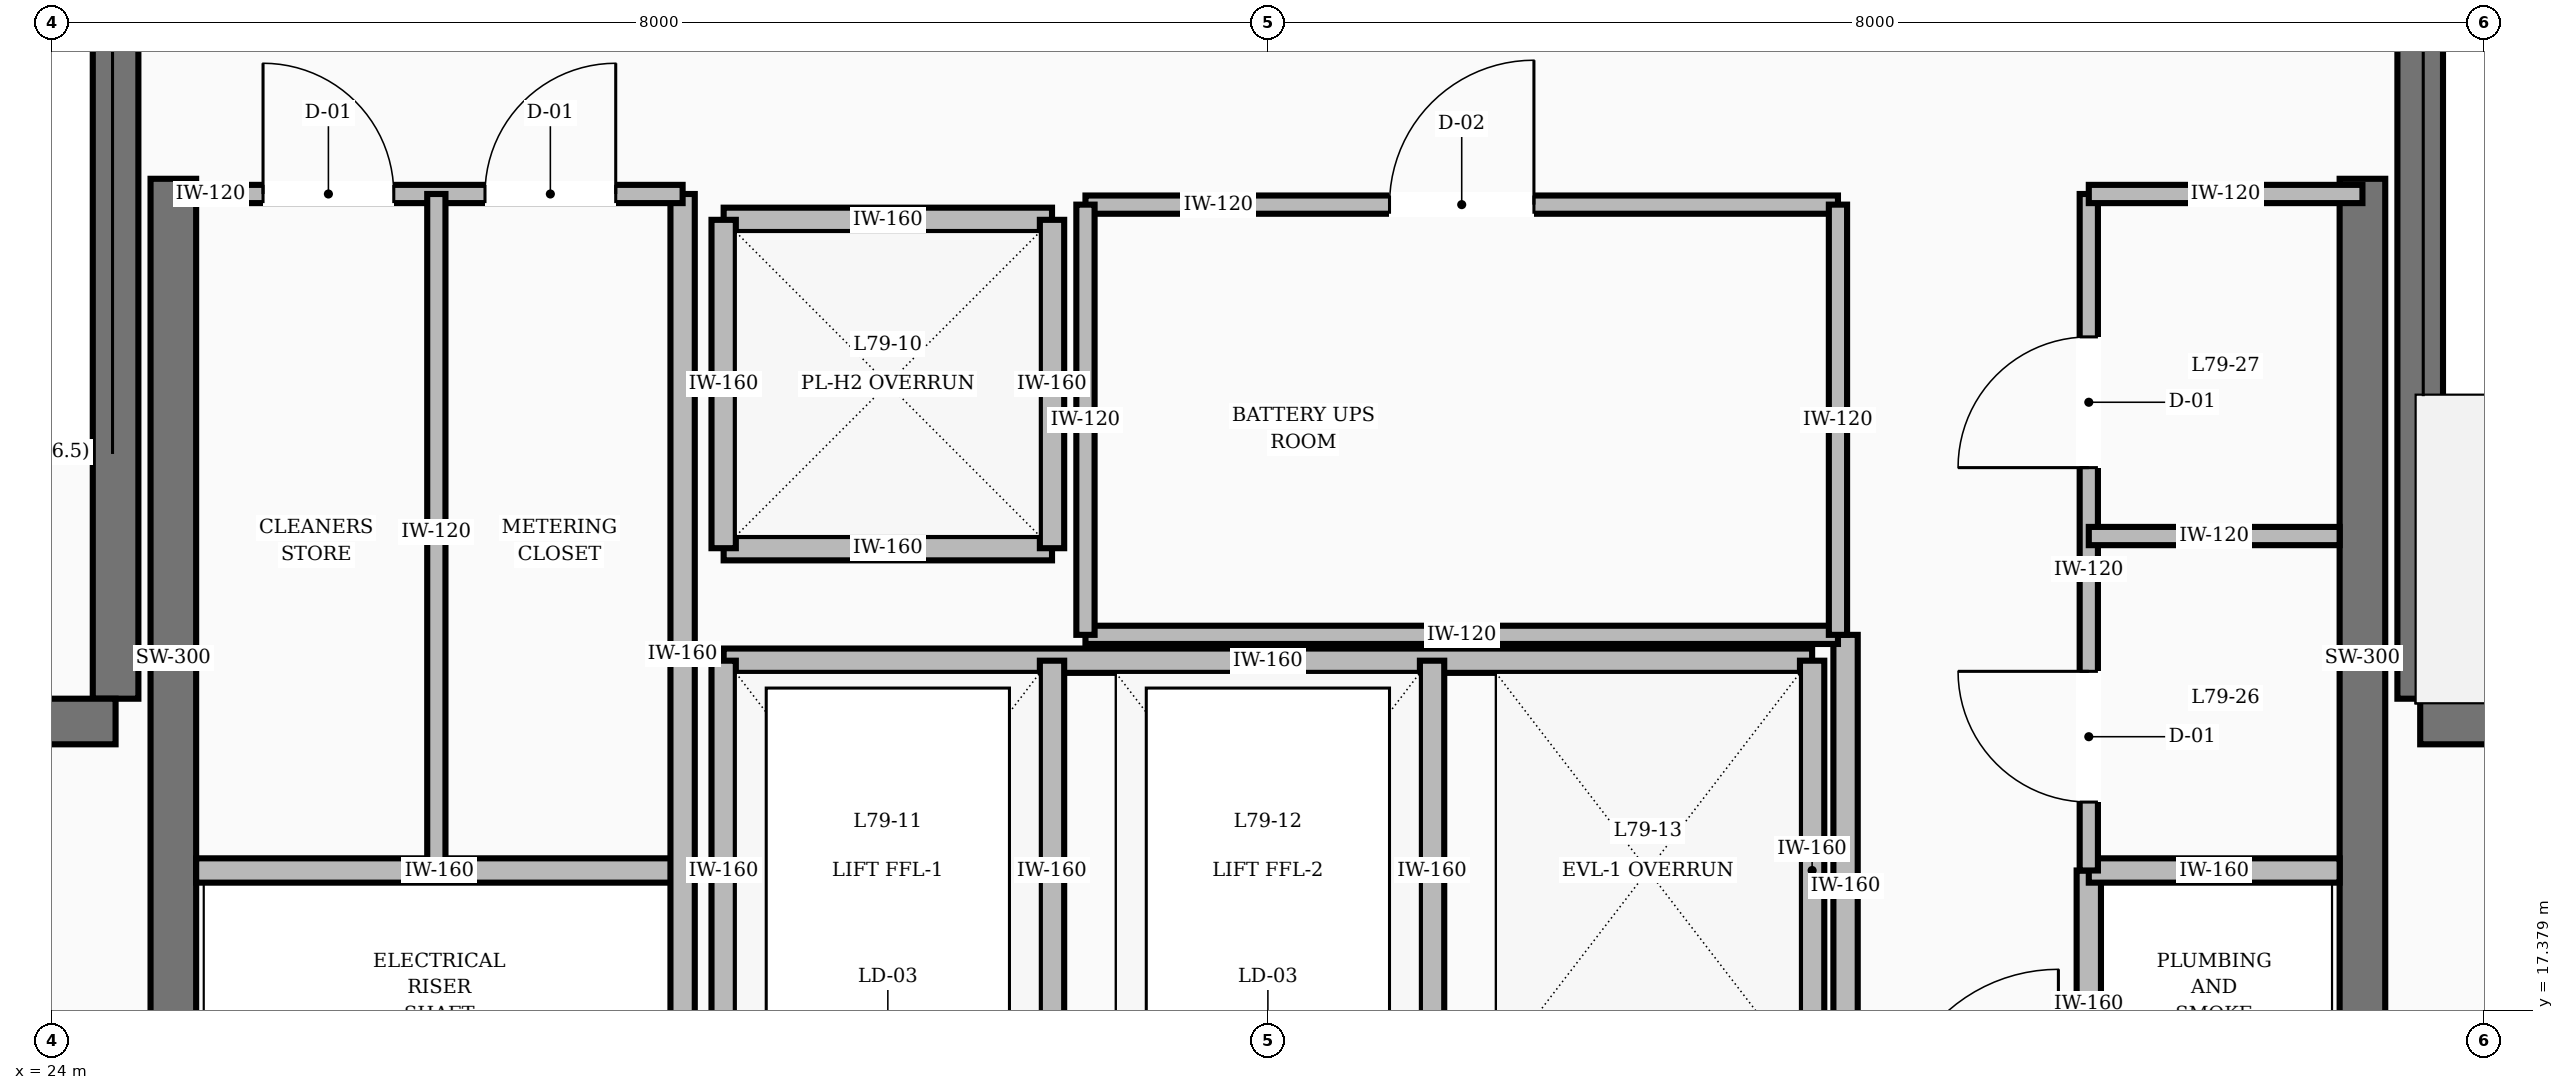
"""IFC4 building model, lengths in metres.
Left out: names, types, materials, properties, quantities, classifications, styles, units other than length and angle.
Written with IfcOpenShell. Run it as: python <this file> out.ifc"""

import sys

from ifc_helpers import new_model, si_unit, direction, frame, frame_2d, origin, place, context, subcontext, project, spatial, rectangle, extrude, element, fill, save


model = new_model("IFC4")
c1 = context("Model", 3, precision=1e-05, world=origin(), true_north=direction((0.0, 1.0)))
c2 = subcontext(c1, "Body", "Model", "MODEL_VIEW")
j1 = project(units=[si_unit("LENGTHUNIT", "METRE"), si_unit("PLANEANGLEUNIT", "RADIAN")], contexts=[c1])
p1 = place(None, origin())
s1 = spatial("IfcSite", under=j1, at=p1, CompositionType="ELEMENT")
p2 = place(p1, origin())
s2 = spatial("IfcBuilding", under=s1, at=p2, CompositionType="ELEMENT")
p3 = place(p2, frame((0.0, 0.0, 302.4)))
s3 = spatial("IfcBuildingStorey", under=s2, at=p3, CompositionType="ELEMENT", Elevation=302.4)
for number, where, z_axis, x_axis in (
    (1, (24.8, 16.55, 0.0), (0.0, 0.0, 1.0), (0.0, 1.0, 0.0)),
    (2, (39.2, 16.55, 0.0), (0.0, 0.0, 1.0), (0.0, 1.0, 0.0)),
):
    element("IfcWall", number, at=place(p3, frame(where, z_axis=z_axis, x_axis=x_axis)), inside=s3, PredefinedType="SHEAR", context=c2, shape_type="SweptSolid", body=[
        extrude(rectangle(XDim=6.3, YDim=0.3, at=frame_2d((3.15, 0.0))), origin(), (0.0, 0.0, 1.0), 6.0),
    ])
p4 = place(p3, frame((24.42, 19.43, 0.0), z_axis=(0.0, 0.0, 1.0), x_axis=(0.0, 1.0, 0.0)))
e3 = element("IfcWall", 3, at=p4, inside=s3, PredefinedType="SHEAR", context=c2, shape_type="SweptSolid", body=[
    extrude(rectangle(XDim=8.74, YDim=0.3, at=frame_2d((4.37, 0.0))), origin(), (0.0, 0.0, 1.0), 6.0),
])
p5 = place(p3, frame((20.82, 19.28, 0.0), z_axis=(0.0, 0.0, 1.0), x_axis=(1.0, 0.0, 0.0)))
e4 = element("IfcWall", 4, at=p5, inside=s3, PredefinedType="SHEAR", context=c2, shape_type="SweptSolid", body=[
    extrude(rectangle(XDim=3.6, YDim=0.3, at=frame_2d((1.8, 0.0))), origin(), (0.0, 0.0, 1.0), 6.0),
])
p6 = place(p5, frame((1.3, 0.0, 0.0)))
e5 = element("IfcOpeningElement", 5, at=p6, cuts=e4, PredefinedType="OPENING", context=c2, shape_type="SweptSolid", body=[
    extrude(rectangle(XDim=1.1, YDim=2.1, at=frame_2d((0.55, 1.05))), frame((0.0, 0.16, 0.0), z_axis=(0.0, -1.0, 0.0), x_axis=(1.0, 0.0, 0.0)), (0.0, 0.0, 1.0), 0.32),
])
p7 = place(p3, frame((39.58, 19.43, 0.0), z_axis=(0.0, 0.0, 1.0), x_axis=(0.0, 1.0, 0.0)))
e6 = element("IfcWall", 6, at=p7, inside=s3, PredefinedType="SHEAR", context=c2, shape_type="SweptSolid", body=[
    extrude(rectangle(XDim=8.74, YDim=0.3, at=frame_2d((4.37, 0.0))), origin(), (0.0, 0.0, 1.0), 6.0),
])
p8 = place(p3, frame((39.58, 19.28, 0.0), z_axis=(0.0, 0.0, 1.0), x_axis=(1.0, 0.0, 0.0)))
e7 = element("IfcWall", 7, at=p8, inside=s3, PredefinedType="SHEAR", context=c2, shape_type="SweptSolid", body=[
    extrude(rectangle(XDim=3.6, YDim=0.3, at=frame_2d((1.8, 0.0))), origin(), (0.0, 0.0, 1.0), 6.0),
])
p9 = place(p3, frame((35.8, 16.55, 0.0), z_axis=(0.0, 0.0, 1.0), x_axis=(0.0, 1.0, 0.0)))
e8 = element("IfcWall", 8, at=p9, inside=s3, PredefinedType="SOLIDWALL", context=c2, shape_type="SweptSolid", body=[
    extrude(rectangle(XDim=3.3, YDim=0.16, at=frame_2d((1.65, 0.0))), origin(), (0.0, 0.0, 1.0), 4.65),
])
p10 = place(p3, frame((37.4, 16.55, 0.0), z_axis=(0.0, 0.0, 1.0), x_axis=(0.0, 1.0, 0.0)))
e9 = element("IfcWall", 9, at=p10, inside=s3, PredefinedType="SOLIDWALL", context=c2, shape_type="SweptSolid", body=[
    extrude(rectangle(XDim=1.75, YDim=0.16, at=frame_2d((0.875, 0.0))), origin(), (0.0, 0.0, 1.0), 4.65),
])
for number, where, z_axis, x_axis in (
    (10, (28.42, 22.58, 0.0), (0.0, 0.0, 1.0), (1.0, 0.0, 0.0)),
    (11, (28.42, 20.42, 0.0), (0.0, 0.0, 1.0), (1.0, 0.0, 0.0)),
    (12, (28.42, 20.42, 0.0), (0.0, 0.0, 1.0), (0.0, 1.0, 0.0)),
    (13, (30.58, 20.42, 0.0), (0.0, 0.0, 1.0), (0.0, 1.0, 0.0)),
):
    element("IfcWall", number, at=place(p3, frame(where, z_axis=z_axis, x_axis=x_axis)), inside=s3, PredefinedType="SOLIDWALL", context=c2, shape_type="SweptSolid", body=[
        extrude(rectangle(XDim=2.16, YDim=0.16, at=frame_2d((1.08, 0.0))), origin(), (0.0, 0.0, 1.0), 4.65),
    ])
p11 = place(p3, frame((28.42, 19.68, 0.0), z_axis=(0.0, 0.0, 1.0), x_axis=(1.0, 0.0, 0.0)))
e14 = element("IfcWall", 14, at=p11, inside=s3, PredefinedType="SOLIDWALL", context=c2, shape_type="SweptSolid", body=[
    extrude(rectangle(XDim=7.16, YDim=0.16, at=frame_2d((3.58, 0.0))), origin(), (0.0, 0.0, 1.0), 4.65),
])
for number, where, z_axis, x_axis in (
    (15, (28.42, 16.92, 0.0), (0.0, 0.0, 1.0), (0.0, 1.0, 0.0)),
    (16, (30.58, 16.92, 0.0), (0.0, 0.0, 1.0), (0.0, 1.0, 0.0)),
    (17, (33.08, 16.92, 0.0), (0.0, 0.0, 1.0), (0.0, 1.0, 0.0)),
    (18, (35.58, 16.92, 0.0), (0.0, 0.0, 1.0), (0.0, 1.0, 0.0)),
):
    element("IfcWall", number, at=place(p3, frame(where, z_axis=z_axis, x_axis=x_axis)), inside=s3, PredefinedType="SOLIDWALL", context=c2, shape_type="SweptSolid", body=[
        extrude(rectangle(XDim=2.76, YDim=0.16, at=frame_2d((1.38, 0.0))), origin(), (0.0, 0.0, 1.0), 4.65),
    ])
p12 = place(p3, frame((30.8, 22.68, 0.0), z_axis=(0.0, 0.0, 1.0), x_axis=(1.0, 0.0, 0.0)))
e19 = element("IfcWall", 19, at=p12, inside=s3, PredefinedType="PARTITIONING", context=c2, shape_type="SweptSolid", body=[
    extrude(rectangle(XDim=4.95, YDim=0.12, at=frame_2d((2.475, 0.0))), origin(), (0.0, 0.0, 1.0), 4.65),
])
p13 = place(p12, frame((2.0, 0.0, 0.0)))
e20 = element("IfcOpeningElement", 20, at=p13, cuts=e19, PredefinedType="OPENING", context=c2, shape_type="SweptSolid", body=[
    extrude(rectangle(XDim=0.95, YDim=2.1, at=frame_2d((0.475, 1.05))), frame((0.0, 0.07, 0.0), z_axis=(0.0, -1.0, 0.0), x_axis=(1.0, 0.0, 0.0)), (0.0, 0.0, 1.0), 0.14),
])
p14 = place(p3, frame((30.8, 19.85, 0.0), z_axis=(0.0, 0.0, 1.0), x_axis=(1.0, 0.0, 0.0)))
e21 = element("IfcWall", 21, at=p14, inside=s3, PredefinedType="PARTITIONING", context=c2, shape_type="SweptSolid", body=[
    extrude(rectangle(XDim=4.95, YDim=0.12, at=frame_2d((2.475, 0.0))), origin(), (0.0, 0.0, 1.0), 4.65),
])
for number, where, z_axis, x_axis in (
    (22, (30.8, 19.85, 0.0), (0.0, 0.0, 1.0), (0.0, 1.0, 0.0)),
    (23, (35.75, 19.85, 0.0), (0.0, 0.0, 1.0), (0.0, 1.0, 0.0)),
):
    element("IfcWall", number, at=place(p3, frame(where, z_axis=z_axis, x_axis=x_axis)), inside=s3, PredefinedType="PARTITIONING", context=c2, shape_type="SweptSolid", body=[
        extrude(rectangle(XDim=2.83, YDim=0.12, at=frame_2d((1.415, 0.0))), origin(), (0.0, 0.0, 1.0), 4.65),
    ])
p15 = place(p3, frame((24.95, 18.3, 0.0), z_axis=(0.0, 0.0, 1.0), x_axis=(1.0, 0.0, 0.0)))
e24 = element("IfcWall", 24, at=p15, inside=s3, PredefinedType="SOLIDWALL", context=c2, shape_type="SweptSolid", body=[
    extrude(rectangle(XDim=3.2, YDim=0.16, at=frame_2d((1.6, 0.0))), origin(), (0.0, 0.0, 1.0), 4.65),
])
p16 = place(p3, frame((28.15, 16.7, 0.0), z_axis=(0.0, 0.0, 1.0), x_axis=(0.0, 1.0, 0.0)))
e25 = element("IfcWall", 25, at=p16, inside=s3, PredefinedType="SOLIDWALL", context=c2, shape_type="SweptSolid", body=[
    extrude(rectangle(XDim=6.05, YDim=0.16, at=frame_2d((3.025, 0.0))), origin(), (0.0, 0.0, 1.0), 4.65),
])
p17 = place(p3, frame((37.4, 18.3, 0.0), z_axis=(0.0, 0.0, 1.0), x_axis=(1.0, 0.0, 0.0)))
e26 = element("IfcWall", 26, at=p17, inside=s3, PredefinedType="SOLIDWALL", context=c2, shape_type="SweptSolid", body=[
    extrude(rectangle(XDim=1.65, YDim=0.16, at=frame_2d((0.825, 0.0))), origin(), (0.0, 0.0, 1.0), 4.65),
])
p18 = place(p3, frame((24.95, 22.75, 0.0), z_axis=(0.0, 0.0, 1.0), x_axis=(1.0, 0.0, 0.0)))
e27 = element("IfcWall", 27, at=p18, inside=s3, PredefinedType="PARTITIONING", context=c2, shape_type="SweptSolid", body=[
    extrude(rectangle(XDim=3.2, YDim=0.12, at=frame_2d((1.6, 0.0))), origin(), (0.0, 0.0, 1.0), 4.65),
])
p19 = place(p18, frame((0.44, 0.0, 0.0)))
e28 = element("IfcOpeningElement", 28, at=p19, cuts=e27, PredefinedType="OPENING", context=c2, shape_type="SweptSolid", body=[
    extrude(rectangle(XDim=0.86, YDim=2.1, at=frame_2d((0.43, 1.05))), frame((0.0, 0.07, 0.0), z_axis=(0.0, -1.0, 0.0), x_axis=(1.0, 0.0, 0.0)), (0.0, 0.0, 1.0), 0.14),
])
p20 = place(p18, frame((1.9, 0.0, 0.0)))
e29 = element("IfcOpeningElement", 29, at=p20, cuts=e27, PredefinedType="OPENING", context=c2, shape_type="SweptSolid", body=[
    extrude(rectangle(XDim=0.86, YDim=2.1, at=frame_2d((0.43, 1.05))), frame((0.0, 0.07, 0.0), z_axis=(0.0, -1.0, 0.0), x_axis=(1.0, 0.0, 0.0)), (0.0, 0.0, 1.0), 0.14),
])
p21 = place(p3, frame((37.4, 18.3, 0.0), z_axis=(0.0, 0.0, 1.0), x_axis=(0.0, 1.0, 0.0)))
e30 = element("IfcWall", 30, at=p21, inside=s3, PredefinedType="PARTITIONING", context=c2, shape_type="SweptSolid", body=[
    extrude(rectangle(XDim=4.45, YDim=0.12, at=frame_2d((2.225, 0.0))), origin(), (0.0, 0.0, 1.0), 4.65),
])
p22 = place(p21, frame((0.45, 0.0, 0.0)))
e31 = element("IfcOpeningElement", 31, at=p22, cuts=e30, PredefinedType="OPENING", context=c2, shape_type="SweptSolid", body=[
    extrude(rectangle(XDim=0.86, YDim=2.1, at=frame_2d((0.43, 1.05))), frame((0.0, 0.07, 0.0), z_axis=(0.0, -1.0, 0.0), x_axis=(1.0, 0.0, 0.0)), (0.0, 0.0, 1.0), 0.14),
])
p23 = place(p21, frame((2.65, 0.0, 0.0)))
e32 = element("IfcOpeningElement", 32, at=p23, cuts=e30, PredefinedType="OPENING", context=c2, shape_type="SweptSolid", body=[
    extrude(rectangle(XDim=0.86, YDim=2.1, at=frame_2d((0.43, 1.05))), frame((0.0, 0.07, 0.0), z_axis=(0.0, -1.0, 0.0), x_axis=(1.0, 0.0, 0.0)), (0.0, 0.0, 1.0), 0.14),
])
p24 = place(p3, frame((37.4, 22.75, 0.0), z_axis=(0.0, 0.0, 1.0), x_axis=(1.0, 0.0, 0.0)))
e33 = element("IfcWall", 33, at=p24, inside=s3, PredefinedType="PARTITIONING", context=c2, shape_type="SweptSolid", body=[
    extrude(rectangle(XDim=1.8, YDim=0.12, at=frame_2d((0.9, 0.0))), origin(), (0.0, 0.0, 1.0), 4.65),
])
p25 = place(p3, frame((26.53, 18.3, 0.0), z_axis=(0.0, 0.0, 1.0), x_axis=(0.0, 1.0, 0.0)))
e34 = element("IfcWall", 34, at=p25, inside=s3, PredefinedType="PARTITIONING", context=c2, shape_type="SweptSolid", body=[
    extrude(rectangle(XDim=4.45, YDim=0.12, at=frame_2d((2.225, 0.0))), origin(), (0.0, 0.0, 1.0), 4.65),
])
p26 = place(p3, frame((37.4, 20.5, 0.0), z_axis=(0.0, 0.0, 1.0), x_axis=(1.0, 0.0, 0.0)))
e35 = element("IfcWall", 35, at=p26, inside=s3, PredefinedType="PARTITIONING", context=c2, shape_type="SweptSolid", body=[
    extrude(rectangle(XDim=1.65, YDim=0.12, at=frame_2d((0.825, 0.0))), origin(), (0.0, 0.0, 1.0), 4.65),
])
p27 = place(p13, origin())
e36 = element("IfcDoor", 36, at=p27, inside=s3, OperationType="SINGLE_SWING_RIGHT", PredefinedType="DOOR", context=c2, shape_type="SweptSolid", body=[
    extrude(rectangle(XDim=0.95, YDim=2.1, at=frame_2d((0.475, 1.05))), frame((0.0, 0.025, 0.0), z_axis=(0.0, -1.0, 0.0), x_axis=(1.0, 0.0, 0.0)), (0.0, 0.0, 1.0), 0.05),
])
fill(e20, e36)
p28 = place(p19, origin())
e37 = element("IfcDoor", 37, at=p28, inside=s3, OperationType="SINGLE_SWING_LEFT", PredefinedType="DOOR", context=c2, shape_type="SweptSolid", body=[
    extrude(rectangle(XDim=0.86, YDim=2.1, at=frame_2d((0.43, 1.05))), frame((0.0, 0.025, 0.0), z_axis=(0.0, -1.0, 0.0), x_axis=(1.0, 0.0, 0.0)), (0.0, 0.0, 1.0), 0.05),
])
fill(e28, e37)
p29 = place(p20, origin())
e38 = element("IfcDoor", 38, at=p29, inside=s3, OperationType="SINGLE_SWING_RIGHT", PredefinedType="DOOR", context=c2, shape_type="SweptSolid", body=[
    extrude(rectangle(XDim=0.86, YDim=2.1, at=frame_2d((0.43, 1.05))), frame((0.0, 0.025, 0.0), z_axis=(0.0, -1.0, 0.0), x_axis=(1.0, 0.0, 0.0)), (0.0, 0.0, 1.0), 0.05),
])
fill(e29, e38)
p30 = place(p22, origin())
e39 = element("IfcDoor", 39, at=p30, inside=s3, OperationType="SINGLE_SWING_RIGHT", PredefinedType="DOOR", context=c2, shape_type="SweptSolid", body=[
    extrude(rectangle(XDim=0.86, YDim=2.1, at=frame_2d((0.43, 1.05))), frame((0.0, 0.025, 0.0), z_axis=(0.0, -1.0, 0.0), x_axis=(1.0, 0.0, 0.0)), (0.0, 0.0, 1.0), 0.05),
])
fill(e31, e39)
p31 = place(p23, origin())
e40 = element("IfcDoor", 40, at=p31, inside=s3, OperationType="SINGLE_SWING_LEFT", PredefinedType="DOOR", context=c2, shape_type="SweptSolid", body=[
    extrude(rectangle(XDim=0.86, YDim=2.1, at=frame_2d((0.43, 1.05))), frame((0.0, 0.025, 0.0), z_axis=(0.0, -1.0, 0.0), x_axis=(1.0, 0.0, 0.0)), (0.0, 0.0, 1.0), 0.05),
])
fill(e32, e40)
save(model, sys.argv[1])
